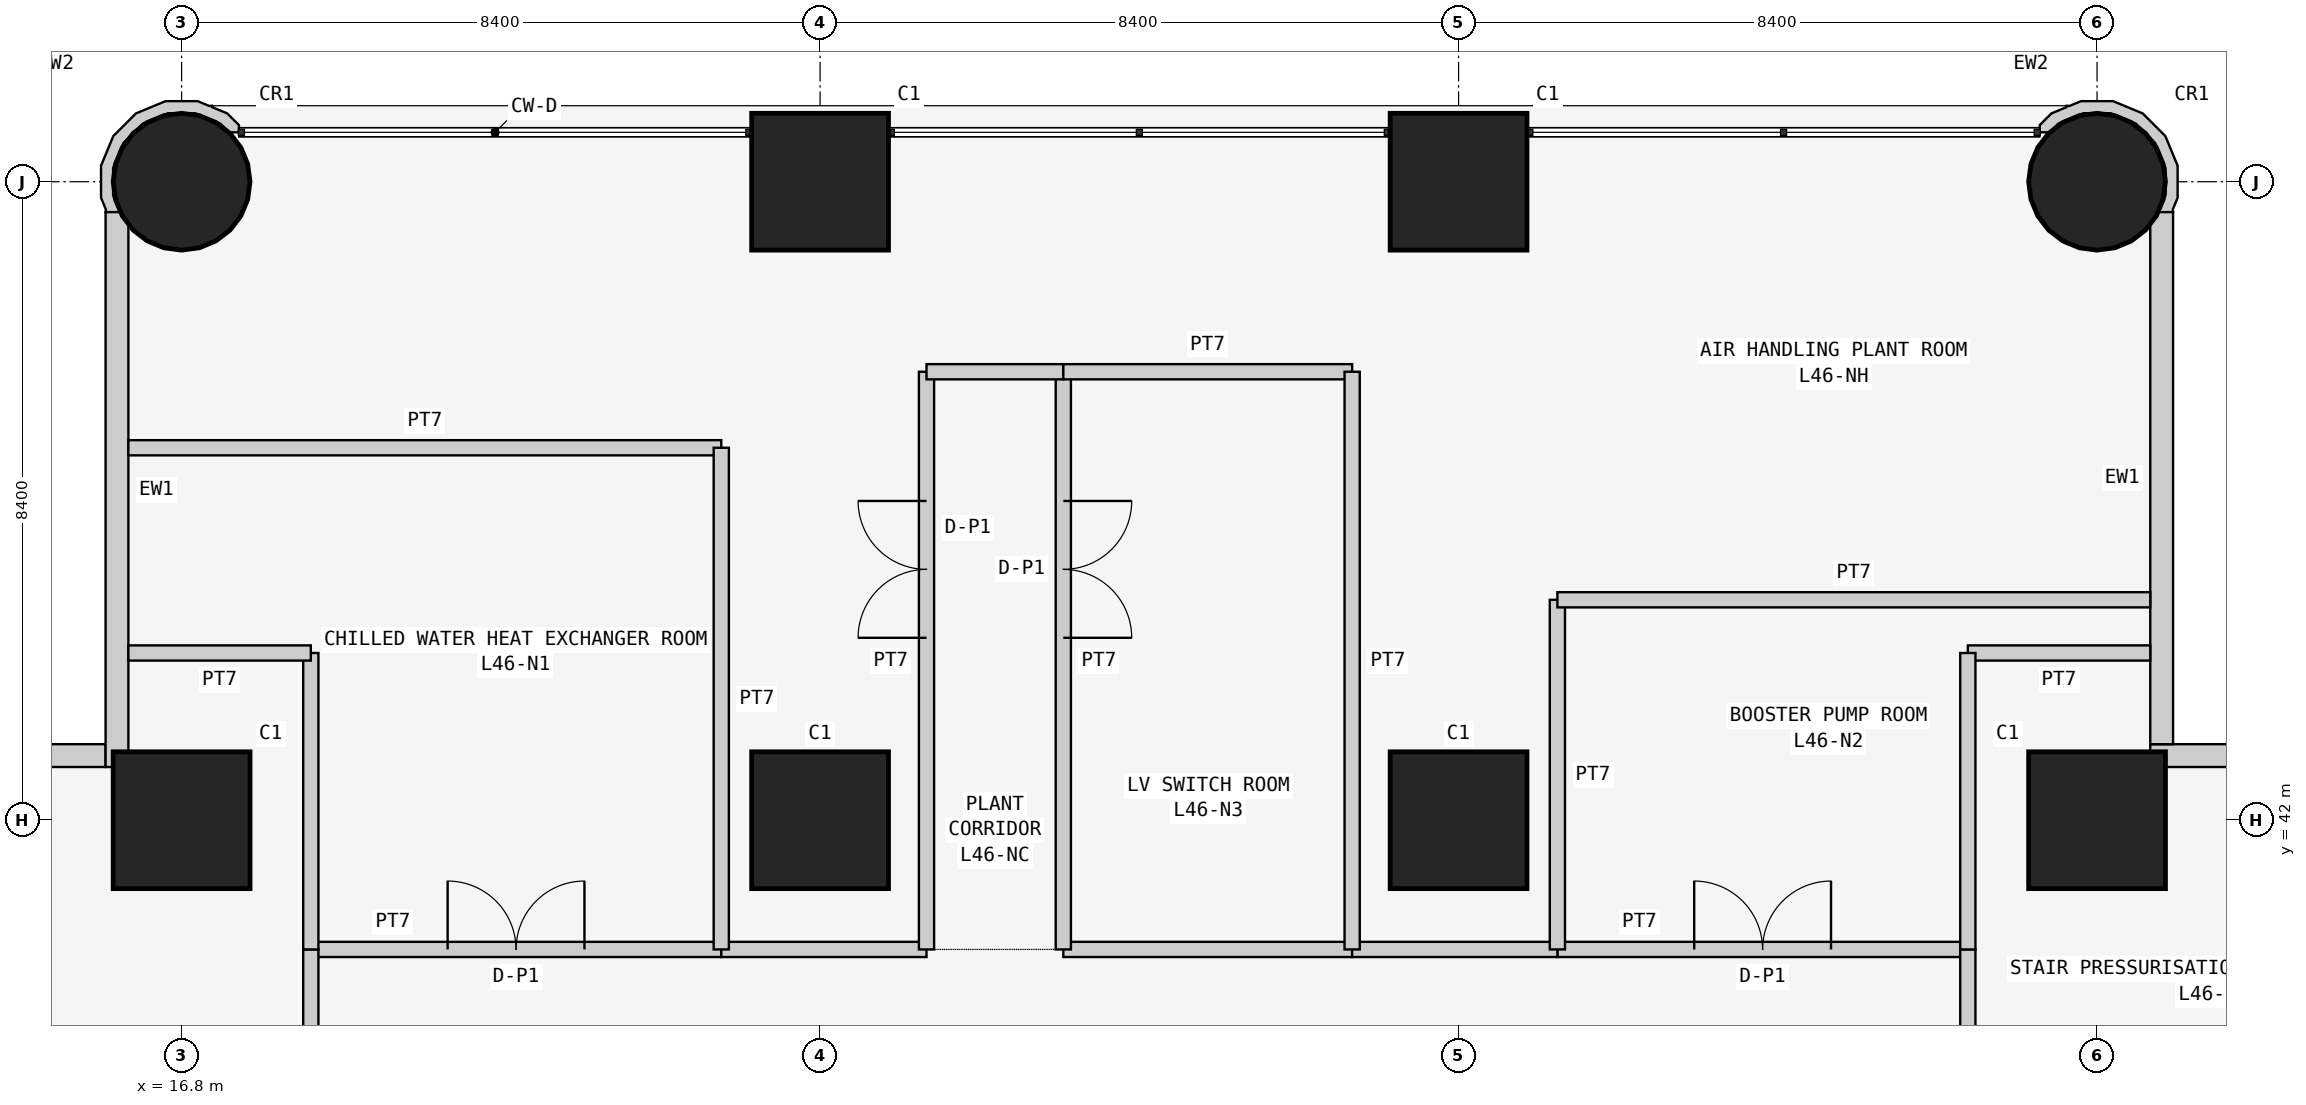
"""IFC4 building model, lengths in metres.
Left out: names, types, materials, properties, quantities, classifications, styles, units other than length and angle.
Written with IfcOpenShell. Run it as: python <this file> out.ifc"""

import sys

from ifc_helpers import new_model, si_unit, direction, frame, frame_2d, origin, origin_2d, place, context, subcontext, project, spatial, polyline, rectangle, circle, outline, extrude, element, fill, save


model = new_model("IFC4")
c1 = context("Model", 3, precision=1e-05, world=origin(), true_north=direction((0.0, 1.0)))
c2 = subcontext(c1, "Body", "Model", "MODEL_VIEW")
j1 = project(units=[si_unit("LENGTHUNIT", "METRE"), si_unit("PLANEANGLEUNIT", "RADIAN")], contexts=[c1])
p1 = place(None, origin())
s1 = spatial("IfcSite", under=j1, at=p1, CompositionType="ELEMENT")
p2 = place(p1, origin())
s2 = spatial("IfcBuilding", under=s1, at=p2, CompositionType="ELEMENT")
p3 = place(p2, frame((0.0, 0.0, 177.3)))
s3 = spatial("IfcBuildingStorey", under=s2, at=p3, CompositionType="ELEMENT", Elevation=177.3)
p4 = place(p3, frame((16.8, 42.0, 0.0), z_axis=(0.0, 0.0, 1.0), x_axis=(1.0, 0.0, 0.0)))
e1 = element("IfcColumn", 1, at=p4, inside=s3, PredefinedType="COLUMN", context=c2, shape_type="SweptSolid", body=[
    extrude(rectangle(XDim=1.8, YDim=1.8, at=origin_2d()), origin(), (0.0, 0.0, 1.0), 6.0),
])
p5 = place(p3, frame((16.8, 50.4, 0.0), z_axis=(0.0, 0.0, 1.0), x_axis=(1.0, 0.0, 0.0)))
e2 = element("IfcColumn", 2, at=p5, inside=s3, PredefinedType="COLUMN", context=c2, shape_type="SweptSolid", body=[
    extrude(circle(Radius=0.9, at=origin_2d()), origin(), (0.0, 0.0, 1.0), 6.0),
])
for number, where, z_axis, x_axis in (
    (3, (25.2, 42.0, 0.0), (0.0, 0.0, 1.0), (1.0, 0.0, 0.0)),
    (4, (25.2, 50.4, 0.0), (0.0, 0.0, 1.0), (1.0, 0.0, 0.0)),
    (5, (33.6, 42.0, 0.0), (0.0, 0.0, 1.0), (1.0, 0.0, 0.0)),
    (6, (33.6, 50.4, 0.0), (0.0, 0.0, 1.0), (1.0, 0.0, 0.0)),
    (7, (42.0, 42.0, 0.0), (0.0, 0.0, 1.0), (1.0, 0.0, 0.0)),
):
    element("IfcColumn", number, at=place(p3, frame(where, z_axis=z_axis, x_axis=x_axis)), inside=s3, PredefinedType="COLUMN", context=c2, shape_type="SweptSolid", body=[
        extrude(rectangle(XDim=1.8, YDim=1.8, at=origin_2d()), origin(), (0.0, 0.0, 1.0), 6.0),
    ])
p6 = place(p3, frame((42.0, 50.4, 0.0), z_axis=(0.0, 0.0, 1.0), x_axis=(1.0, 0.0, 0.0)))
e8 = element("IfcColumn", 8, at=p6, inside=s3, PredefinedType="COLUMN", context=c2, shape_type="SweptSolid", body=[
    extrude(circle(Radius=0.9, at=origin_2d()), origin(), (0.0, 0.0, 1.0), 6.0),
])
p7 = place(p3, frame((15.8, 42.85, 0.0), z_axis=(0.0, 0.0, 1.0), x_axis=(-1.0, 0.0, 0.0)))
e9 = element("IfcWall", 9, at=p7, inside=s3, PredefinedType="SOLIDWALL", context=c2, shape_type="SweptSolid", body=[
    extrude(rectangle(XDim=15.4, YDim=0.3, at=frame_2d((7.7, 0.0))), origin(), (0.0, 0.0, 1.0), 5.85),
])
p8 = place(p3, frame((58.4, 42.85, 0.0), z_axis=(0.0, 0.0, 1.0), x_axis=(-1.0, 0.0, 0.0)))
e10 = element("IfcWall", 10, at=p8, inside=s3, PredefinedType="SOLIDWALL", context=c2, shape_type="SweptSolid", body=[
    extrude(rectangle(XDim=15.7, YDim=0.3, at=frame_2d((7.85, 0.0))), origin(), (0.0, 0.0, 1.0), 5.85),
])
p9 = place(p3, frame((42.85, 43.0, 0.0), z_axis=(0.0, 0.0, 1.0), x_axis=(0.0, 1.0, 0.0)))
e11 = element("IfcWall", 11, at=p9, inside=s3, PredefinedType="SOLIDWALL", context=c2, shape_type="SweptSolid", body=[
    extrude(rectangle(XDim=7.0, YDim=0.3, at=frame_2d((3.5, 0.0))), origin(), (0.0, 0.0, 1.0), 5.85),
])
p10 = place(p3, frame((15.95, 50.0, 0.0), z_axis=(0.0, 0.0, 1.0), x_axis=(0.0, -1.0, 0.0)))
e12 = element("IfcWall", 12, at=p10, inside=s3, PredefinedType="SOLIDWALL", context=c2, shape_type="SweptSolid", body=[
    extrude(rectangle(XDim=7.3, YDim=0.3, at=frame_2d((3.65, 0.0))), origin(), (0.0, 0.0, 1.0), 5.85),
])
p11 = place(p3, frame((42.91, 50.036, 0.0), z_axis=(0.0, 0.0, 1.0), x_axis=(0.382241468967, 0.924062475919, 0.0)))
e13 = element("IfcWall", 13, at=p11, inside=s3, PredefinedType="SOLIDWALL", context=c2, shape_type="SweptSolid", body=[
    extrude(outline(polyline([(0.76, 1.732), (0.741, 1.727), (0.589, 1.878), (0.388, 1.962), (0.301, 1.926), (0.351, 1.805), (0.499, 1.744), (0.753, 1.49), (0.89, 1.159), (0.889, 0.8), (0.752, 0.469), (0.498, 0.216), (0.167, 0.079), (-0.1, 0.079), (0.001, -0.097), (0.031, -0.08), (0.199, -0.08), (0.589, 0.081), (0.887, 0.379), (1.048, 0.769), (1.049, 1.19), (0.887, 1.58), (0.768, 1.699), (0.76, 1.732)])), origin(), (0.0, 0.0, 1.0), 5.85),
])
p12 = place(p3, frame((17.497, 51.089, 0.0), z_axis=(0.0, 0.0, 1.0), x_axis=(-0.382241468967, 0.924062475919, 0.0)))
e14 = element("IfcWall", 14, at=p12, inside=s3, PredefinedType="SOLIDWALL", context=c2, shape_type="SweptSolid", body=[
    extrude(outline(polyline([(-0.357, 1.984), (-0.459, 1.809), (-0.191, 1.809), (0.14, 1.672), (0.394, 1.418), (0.531, 1.087), (0.531, 0.729), (0.394, 0.398), (0.141, 0.144), (-0.008, 0.082), (-0.057, -0.038), (0.03, -0.074), (0.231, 0.009), (0.383, 0.161), (0.401, 0.156), (0.41, 0.188), (0.529, 0.308), (0.69, 0.697), (0.69, 1.119), (0.529, 1.508), (0.23, 1.807), (-0.159, 1.968), (-0.328, 1.968), (-0.357, 1.984)])), origin(), (0.0, 0.0, 1.0), 5.85),
])
p13 = place(p3, frame((18.5, 40.3, 0.0), z_axis=(0.0, 0.0, 1.0), x_axis=(1.0, 0.0, 0.0)))
e15 = element("IfcWall", 15, at=p13, inside=s3, PredefinedType="PARTITIONING", context=c2, shape_type="SweptSolid", body=[
    extrude(rectangle(XDim=5.4, YDim=0.2, at=frame_2d((2.7, 0.0))), origin(), (0.0, 0.0, 1.0), 5.85),
])
p14 = place(p13, frame((1.8, 0.0, 0.0)))
e16 = element("IfcOpeningElement", 16, at=p14, cuts=e15, PredefinedType="OPENING", context=c2, shape_type="SweptSolid", body=[
    extrude(rectangle(XDim=1.8, YDim=2.4, at=frame_2d((0.9, 1.2))), frame((0.0, 0.11, 0.0), z_axis=(0.0, -1.0, 0.0), x_axis=(1.0, 0.0, 0.0)), (0.0, 0.0, 1.0), 0.22),
])
p15 = place(p3, frame((34.9, 40.3, 0.0), z_axis=(0.0, 0.0, 1.0), x_axis=(1.0, 0.0, 0.0)))
e17 = element("IfcWall", 17, at=p15, inside=s3, PredefinedType="PARTITIONING", context=c2, shape_type="SweptSolid", body=[
    extrude(rectangle(XDim=5.4, YDim=0.2, at=frame_2d((2.7, 0.0))), origin(), (0.0, 0.0, 1.0), 5.85),
])
p16 = place(p15, frame((1.8, 0.0, 0.0)))
e18 = element("IfcOpeningElement", 18, at=p16, cuts=e17, PredefinedType="OPENING", context=c2, shape_type="SweptSolid", body=[
    extrude(rectangle(XDim=1.8, YDim=2.4, at=frame_2d((0.9, 1.2))), frame((0.0, 0.11, 0.0), z_axis=(0.0, -1.0, 0.0), x_axis=(1.0, 0.0, 0.0)), (0.0, 0.0, 1.0), 0.22),
])
p17 = place(p3, frame((28.4, 40.3, 0.0), z_axis=(0.0, 0.0, 1.0), x_axis=(1.0, 0.0, 0.0)))
e19 = element("IfcWall", 19, at=p17, inside=s3, PredefinedType="PARTITIONING", context=c2, shape_type="SweptSolid", body=[
    extrude(rectangle(XDim=3.8, YDim=0.2, at=frame_2d((1.9, 0.0))), origin(), (0.0, 0.0, 1.0), 5.85),
])
p18 = place(p3, frame((23.9, 40.3, 0.0), z_axis=(0.0, 0.0, 1.0), x_axis=(1.0, 0.0, 0.0)))
e20 = element("IfcWall", 20, at=p18, inside=s3, PredefinedType="PARTITIONING", context=c2, shape_type="SweptSolid", body=[
    extrude(rectangle(XDim=2.7, YDim=0.2, at=frame_2d((1.35, 0.0))), origin(), (0.0, 0.0, 1.0), 5.85),
])
p19 = place(p3, frame((32.2, 40.3, 0.0), z_axis=(0.0, 0.0, 1.0), x_axis=(1.0, 0.0, 0.0)))
e21 = element("IfcWall", 21, at=p19, inside=s3, PredefinedType="PARTITIONING", context=c2, shape_type="SweptSolid", body=[
    extrude(rectangle(XDim=2.7, YDim=0.2, at=frame_2d((1.35, 0.0))), origin(), (0.0, 0.0, 1.0), 5.85),
])
p20 = place(p3, frame((40.3, 40.3, 0.0), z_axis=(0.0, 0.0, 1.0), x_axis=(0.0, -1.0, 0.0)))
e22 = element("IfcWall", 22, at=p20, inside=s3, PredefinedType="PARTITIONING", context=c2, shape_type="SweptSolid", body=[
    extrude(rectangle(XDim=5.4, YDim=0.2, at=frame_2d((2.7, 0.0))), origin(), (0.0, 0.0, 1.0), 5.85),
])
p21 = place(p20, frame((1.8, 0.0, 0.0)))
e23 = element("IfcOpeningElement", 23, at=p21, cuts=e22, PredefinedType="OPENING", context=c2, shape_type="SweptSolid", body=[
    extrude(rectangle(XDim=1.8, YDim=2.4, at=frame_2d((0.9, 1.2))), frame((0.0, 0.11, 0.0), z_axis=(0.0, -1.0, 0.0), x_axis=(1.0, 0.0, 0.0)), (0.0, 0.0, 1.0), 0.22),
])
p22 = place(p3, frame((18.5, 34.9, 0.0), z_axis=(0.0, 0.0, 1.0), x_axis=(0.0, 1.0, 0.0)))
e24 = element("IfcWall", 24, at=p22, inside=s3, PredefinedType="PARTITIONING", context=c2, shape_type="SweptSolid", body=[
    extrude(rectangle(XDim=5.4, YDim=0.2, at=frame_2d((2.7, 0.0))), origin(), (0.0, 0.0, 1.0), 5.85),
])
p23 = place(p22, frame((1.8, 0.0, 0.0)))
e25 = element("IfcOpeningElement", 25, at=p23, cuts=e24, PredefinedType="OPENING", context=c2, shape_type="SweptSolid", body=[
    extrude(rectangle(XDim=1.8, YDim=2.4, at=frame_2d((0.9, 1.2))), frame((0.0, 0.11, 0.0), z_axis=(0.0, -1.0, 0.0), x_axis=(1.0, 0.0, 0.0)), (0.0, 0.0, 1.0), 0.22),
])
p24 = place(p3, frame((16.1, 46.9, 0.0), z_axis=(0.0, 0.0, 1.0), x_axis=(1.0, 0.0, 0.0)))
e26 = element("IfcWall", 26, at=p24, inside=s3, PredefinedType="PARTITIONING", context=c2, shape_type="SweptSolid", body=[
    extrude(rectangle(XDim=7.8, YDim=0.2, at=frame_2d((3.9, 0.0))), origin(), (0.0, 0.0, 1.0), 5.85),
])
p25 = place(p3, frame((23.9, 46.9, 0.0), z_axis=(0.0, 0.0, 1.0), x_axis=(0.0, -1.0, 0.0)))
e27 = element("IfcWall", 27, at=p25, inside=s3, PredefinedType="PARTITIONING", context=c2, shape_type="SweptSolid", body=[
    extrude(rectangle(XDim=6.6, YDim=0.2, at=frame_2d((3.3, 0.0))), origin(), (0.0, 0.0, 1.0), 5.85),
])
p26 = place(p3, frame((18.5, 40.3, 0.0), z_axis=(0.0, 0.0, 1.0), x_axis=(0.0, 1.0, 0.0)))
e28 = element("IfcWall", 28, at=p26, inside=s3, PredefinedType="PARTITIONING", context=c2, shape_type="SweptSolid", body=[
    extrude(rectangle(XDim=3.9, YDim=0.2, at=frame_2d((1.95, 0.0))), origin(), (0.0, 0.0, 1.0), 5.85),
])
p27 = place(p3, frame((18.5, 44.2, 0.0), z_axis=(0.0, 0.0, 1.0), x_axis=(-1.0, 0.0, 0.0)))
e29 = element("IfcWall", 29, at=p27, inside=s3, PredefinedType="PARTITIONING", context=c2, shape_type="SweptSolid", body=[
    extrude(rectangle(XDim=2.4, YDim=0.2, at=frame_2d((1.2, 0.0))), origin(), (0.0, 0.0, 1.0), 5.85),
])
p28 = place(p3, frame((34.9, 40.3, 0.0), z_axis=(0.0, 0.0, 1.0), x_axis=(0.0, 1.0, 0.0)))
e30 = element("IfcWall", 30, at=p28, inside=s3, PredefinedType="PARTITIONING", context=c2, shape_type="SweptSolid", body=[
    extrude(rectangle(XDim=4.6, YDim=0.2, at=frame_2d((2.3, 0.0))), origin(), (0.0, 0.0, 1.0), 5.85),
])
p29 = place(p3, frame((34.9, 44.9, 0.0), z_axis=(0.0, 0.0, 1.0), x_axis=(1.0, 0.0, 0.0)))
e31 = element("IfcWall", 31, at=p29, inside=s3, PredefinedType="PARTITIONING", context=c2, shape_type="SweptSolid", body=[
    extrude(rectangle(XDim=7.8, YDim=0.2, at=frame_2d((3.9, 0.0))), origin(), (0.0, 0.0, 1.0), 5.85),
])
p30 = place(p3, frame((42.7, 44.2, 0.0), z_axis=(0.0, 0.0, 1.0), x_axis=(-1.0, 0.0, 0.0)))
e32 = element("IfcWall", 32, at=p30, inside=s3, PredefinedType="PARTITIONING", context=c2, shape_type="SweptSolid", body=[
    extrude(rectangle(XDim=2.4, YDim=0.2, at=frame_2d((1.2, 0.0))), origin(), (0.0, 0.0, 1.0), 5.85),
])
p31 = place(p3, frame((40.3, 44.2, 0.0), z_axis=(0.0, 0.0, 1.0), x_axis=(0.0, -1.0, 0.0)))
e33 = element("IfcWall", 33, at=p31, inside=s3, PredefinedType="PARTITIONING", context=c2, shape_type="SweptSolid", body=[
    extrude(rectangle(XDim=3.9, YDim=0.2, at=frame_2d((1.95, 0.0))), origin(), (0.0, 0.0, 1.0), 5.85),
])
p32 = place(p3, frame((28.4, 47.9, 0.0), z_axis=(0.0, 0.0, 1.0), x_axis=(0.0, -1.0, 0.0)))
e34 = element("IfcWall", 34, at=p32, inside=s3, PredefinedType="PARTITIONING", context=c2, shape_type="SweptSolid", body=[
    extrude(rectangle(XDim=7.6, YDim=0.2, at=frame_2d((3.8, 0.0))), origin(), (0.0, 0.0, 1.0), 5.85),
])
p33 = place(p32, frame((1.7, 0.0, 0.0)))
e35 = element("IfcOpeningElement", 35, at=p33, cuts=e34, PredefinedType="OPENING", context=c2, shape_type="SweptSolid", body=[
    extrude(rectangle(XDim=1.8, YDim=2.4, at=frame_2d((0.9, 1.2))), frame((0.0, 0.11, 0.0), z_axis=(0.0, -1.0, 0.0), x_axis=(1.0, 0.0, 0.0)), (0.0, 0.0, 1.0), 0.22),
])
p34 = place(p3, frame((26.6, 40.3, 0.0), z_axis=(0.0, 0.0, 1.0), x_axis=(0.0, 1.0, 0.0)))
e36 = element("IfcWall", 36, at=p34, inside=s3, PredefinedType="PARTITIONING", context=c2, shape_type="SweptSolid", body=[
    extrude(rectangle(XDim=7.6, YDim=0.2, at=frame_2d((3.8, 0.0))), origin(), (0.0, 0.0, 1.0), 5.85),
])
p35 = place(p34, frame((4.1, 0.0, 0.0)))
e37 = element("IfcOpeningElement", 37, at=p35, cuts=e36, PredefinedType="OPENING", context=c2, shape_type="SweptSolid", body=[
    extrude(rectangle(XDim=1.8, YDim=2.4, at=frame_2d((0.9, 1.2))), frame((0.0, 0.11, 0.0), z_axis=(0.0, -1.0, 0.0), x_axis=(1.0, 0.0, 0.0)), (0.0, 0.0, 1.0), 0.22),
])
p36 = place(p3, frame((26.6, 47.9, 0.0), z_axis=(0.0, 0.0, 1.0), x_axis=(1.0, 0.0, 0.0)))
e38 = element("IfcWall", 38, at=p36, inside=s3, PredefinedType="PARTITIONING", context=c2, shape_type="SweptSolid", body=[
    extrude(rectangle(XDim=1.8, YDim=0.2, at=frame_2d((0.9, 0.0))), origin(), (0.0, 0.0, 1.0), 5.85),
])
p37 = place(p3, frame((28.4, 47.9, 0.0), z_axis=(0.0, 0.0, 1.0), x_axis=(1.0, 0.0, 0.0)))
e39 = element("IfcWall", 39, at=p37, inside=s3, PredefinedType="PARTITIONING", context=c2, shape_type="SweptSolid", body=[
    extrude(rectangle(XDim=3.8, YDim=0.2, at=frame_2d((1.9, 0.0))), origin(), (0.0, 0.0, 1.0), 5.85),
])
p38 = place(p3, frame((32.2, 47.9, 0.0), z_axis=(0.0, 0.0, 1.0), x_axis=(0.0, -1.0, 0.0)))
e40 = element("IfcWall", 40, at=p38, inside=s3, PredefinedType="PARTITIONING", context=c2, shape_type="SweptSolid", body=[
    extrude(rectangle(XDim=7.6, YDim=0.2, at=frame_2d((3.8, 0.0))), origin(), (0.0, 0.0, 1.0), 5.85),
])
p39 = place(p14, origin())
e41 = element("IfcDoor", 41, at=p39, inside=s3, OperationType="DOUBLE_DOOR_SINGLE_SWING", PredefinedType="DOOR", context=c2, shape_type="SweptSolid", body=[
    extrude(rectangle(XDim=1.8, YDim=2.4, at=frame_2d((0.9, 1.2))), frame((0.0, 0.025, 0.0), z_axis=(0.0, -1.0, 0.0), x_axis=(1.0, 0.0, 0.0)), (0.0, 0.0, 1.0), 0.05),
])
fill(e16, e41)
p40 = place(p16, origin())
e42 = element("IfcDoor", 42, at=p40, inside=s3, OperationType="DOUBLE_DOOR_SINGLE_SWING", PredefinedType="DOOR", context=c2, shape_type="SweptSolid", body=[
    extrude(rectangle(XDim=1.8, YDim=2.4, at=frame_2d((0.9, 1.2))), frame((0.0, 0.025, 0.0), z_axis=(0.0, -1.0, 0.0), x_axis=(1.0, 0.0, 0.0)), (0.0, 0.0, 1.0), 0.05),
])
fill(e18, e42)
p41 = place(p33, origin())
e43 = element("IfcDoor", 43, at=p41, inside=s3, OperationType="DOUBLE_DOOR_SINGLE_SWING", PredefinedType="DOOR", context=c2, shape_type="SweptSolid", body=[
    extrude(rectangle(XDim=1.8, YDim=2.4, at=frame_2d((0.9, 1.2))), frame((0.0, 0.025, 0.0), z_axis=(0.0, -1.0, 0.0), x_axis=(1.0, 0.0, 0.0)), (0.0, 0.0, 1.0), 0.05),
])
fill(e35, e43)
p42 = place(p35, origin())
e44 = element("IfcDoor", 44, at=p42, inside=s3, OperationType="DOUBLE_DOOR_SINGLE_SWING", PredefinedType="DOOR", context=c2, shape_type="SweptSolid", body=[
    extrude(rectangle(XDim=1.8, YDim=2.4, at=frame_2d((0.9, 1.2))), frame((0.0, 0.025, 0.0), z_axis=(0.0, -1.0, 0.0), x_axis=(1.0, 0.0, 0.0)), (0.0, 0.0, 1.0), 0.05),
])
fill(e37, e44)
save(model, sys.argv[1])
